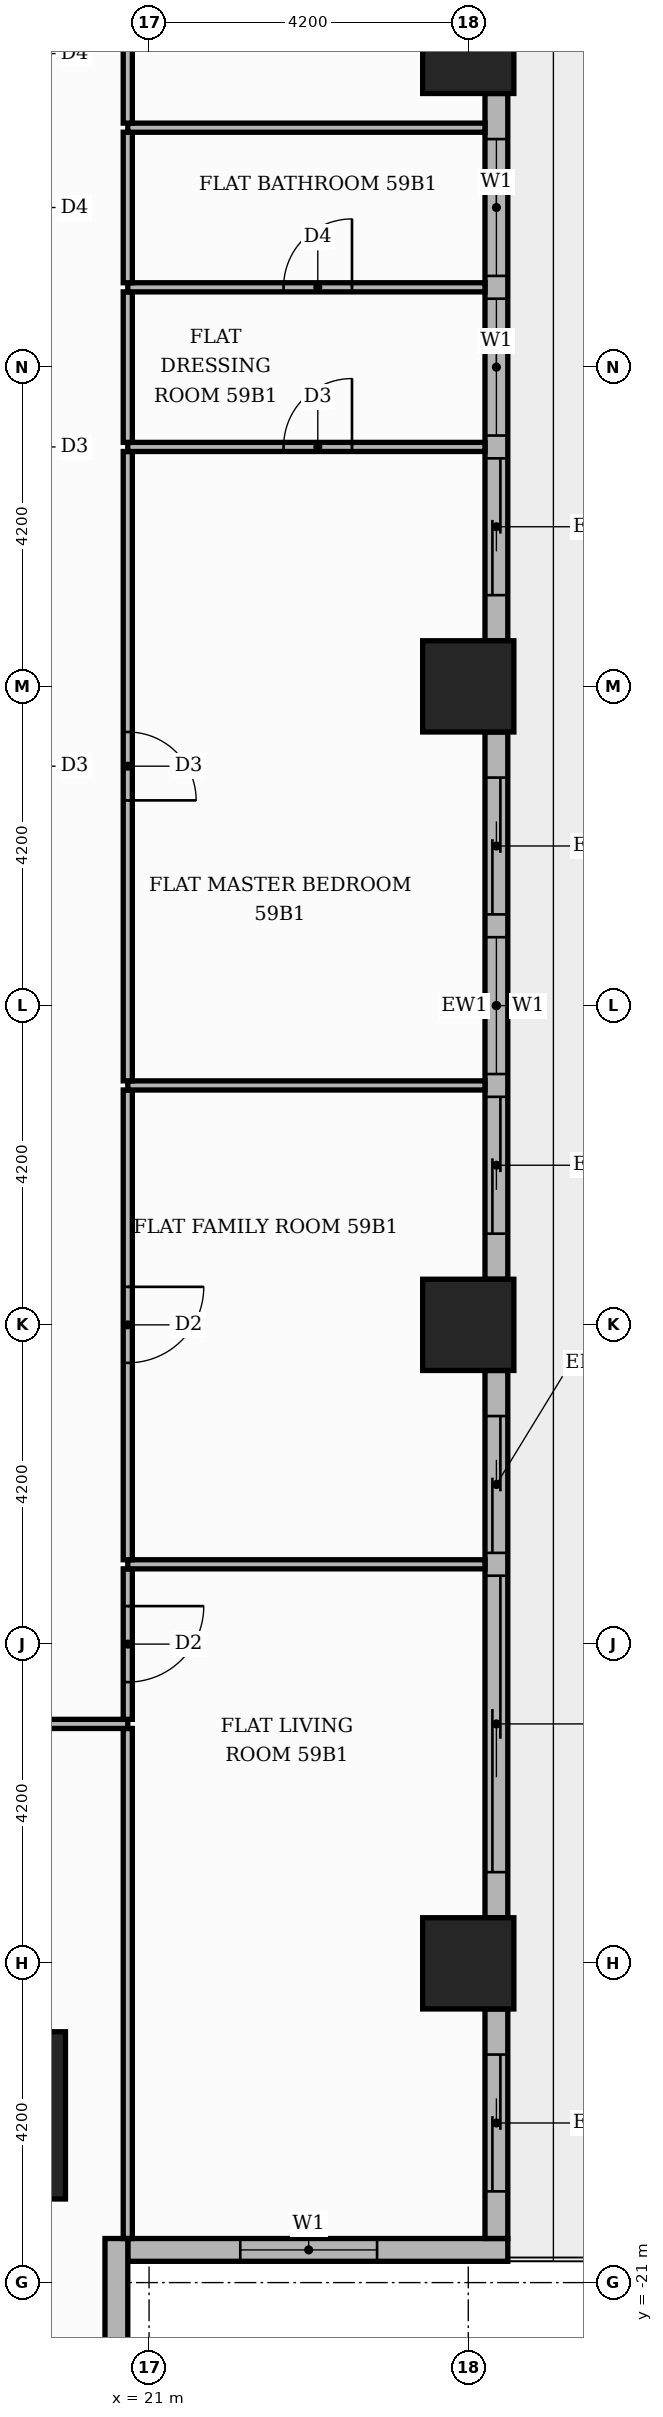
"""IFC4 building model, lengths in metres.
Left out: names, types, materials, properties, quantities, classifications, styles, units other than length and angle.
Written with IfcOpenShell. Run it as: python <this file> out.ifc"""

import sys

from ifc_helpers import new_model, si_unit, direction, frame, frame_2d, origin, origin_2d, place, context, subcontext, project, spatial, rectangle, extrude, element, fill, save


model = new_model("IFC4")
c1 = context("Model", 3, precision=1e-05, world=origin(), true_north=direction((0.0, 1.0)))
c2 = subcontext(c1, "Body", "Model", "MODEL_VIEW")
j1 = project(units=[si_unit("LENGTHUNIT", "METRE"), si_unit("PLANEANGLEUNIT", "RADIAN")], contexts=[c1])
p1 = place(None, origin())
s1 = spatial("IfcSite", under=j1, at=p1, CompositionType="ELEMENT")
p2 = place(p1, origin())
s2 = spatial("IfcBuilding", under=s1, at=p2, CompositionType="ELEMENT")
p3 = place(p2, frame((0.0, 0.0, 248.4)))
s3 = spatial("IfcBuildingStorey", under=s2, at=p3, CompositionType="ELEMENT", Elevation=248.4)
p4 = place(p3, frame((18.8, -18.8, 0.0), z_axis=(0.0, 0.0, 1.0), x_axis=(1.0, 0.0, 0.0)))
e1 = element("IfcColumn", 1, at=p4, inside=s3, PredefinedType="COLUMN", context=c2, shape_type="SweptSolid", body=[
    extrude(rectangle(XDim=2.2, YDim=2.2, at=origin_2d()), origin(), (0.0, 0.0, 1.0), 3.9),
])
for number, where, z_axis, x_axis in (
    (2, (25.2, 0.0, 0.0), (0.0, 0.0, 1.0), (1.0, 0.0, 0.0)),
    (3, (25.2, 8.4, 0.0), (0.0, 0.0, 1.0), (1.0, 0.0, 0.0)),
    (4, (25.2, -8.4, 0.0), (0.0, 0.0, 1.0), (1.0, 0.0, 0.0)),
    (5, (25.2, -16.8, 0.0), (0.0, 0.0, 1.0), (1.0, 0.0, 0.0)),
):
    element("IfcColumn", number, at=place(p3, frame(where, z_axis=z_axis, x_axis=x_axis)), inside=s3, PredefinedType="COLUMN", context=c2, shape_type="SweptSolid", body=[
        extrude(rectangle(XDim=1.2, YDim=1.2, at=origin_2d()), origin(), (0.0, 0.0, 1.0), 3.9),
    ])
p5 = place(p3, frame((20.72, -20.57, 0.0), z_axis=(0.0, 0.0, 1.0), x_axis=(1.0, 0.0, 0.0)))
e6 = element("IfcWall", 6, at=p5, inside=s3, PredefinedType="STANDARD", context=c2, shape_type="SweptSolid", body=[
    extrude(rectangle(XDim=5.0, YDim=0.3, at=frame_2d((2.5, 0.0))), origin(), (0.0, 0.0, 1.0), 3.48),
])
p6 = place(p5, frame((1.48, 0.0, 0.9)))
e7 = element("IfcOpeningElement", 7, at=p6, cuts=e6, PredefinedType="OPENING", context=c2, shape_type="SweptSolid", body=[
    extrude(rectangle(XDim=1.8, YDim=2.1, at=frame_2d((0.9, 1.05))), frame((0.0, 0.16, 0.0), z_axis=(0.0, -1.0, 0.0), x_axis=(1.0, 0.0, 0.0)), (0.0, 0.0, 1.0), 0.32),
])
p7 = place(p3, frame((25.57, -20.42, 0.0), z_axis=(0.0, 0.0, 1.0), x_axis=(0.0, 1.0, 0.0)))
e8 = element("IfcWall", 8, at=p7, inside=s3, PredefinedType="STANDARD", context=c2, shape_type="SweptSolid", body=[
    extrude(rectangle(XDim=3.02, YDim=0.3, at=frame_2d((1.51, 0.0))), origin(), (0.0, 0.0, 1.0), 3.48),
])
p8 = place(p7, frame((0.62, 0.0, 0.0)))
e9 = element("IfcOpeningElement", 9, at=p8, cuts=e8, PredefinedType="OPENING", context=c2, shape_type="SweptSolid", body=[
    extrude(rectangle(XDim=1.8, YDim=2.4, at=frame_2d((0.9, 1.2))), frame((0.0, 0.16, 0.0), z_axis=(0.0, -1.0, 0.0), x_axis=(1.0, 0.0, 0.0)), (0.0, 0.0, 1.0), 0.32),
])
p9 = place(p3, frame((25.57, -16.2, 0.0), z_axis=(0.0, 0.0, 1.0), x_axis=(0.0, 1.0, 0.0)))
e10 = element("IfcWall", 10, at=p9, inside=s3, PredefinedType="STANDARD", context=c2, shape_type="SweptSolid", body=[
    extrude(rectangle(XDim=7.2, YDim=0.3, at=frame_2d((3.6, 0.0))), origin(), (0.0, 0.0, 1.0), 3.48),
])
p10 = place(p9, frame((0.6, 0.0, 0.0)))
e11 = element("IfcOpeningElement", 11, at=p10, cuts=e10, PredefinedType="OPENING", context=c2, shape_type="SweptSolid", body=[
    extrude(rectangle(XDim=3.9, YDim=2.4, at=frame_2d((1.95, 1.2))), frame((0.0, 0.16, 0.0), z_axis=(0.0, -1.0, 0.0), x_axis=(1.0, 0.0, 0.0)), (0.0, 0.0, 1.0), 0.32),
])
p11 = place(p9, frame((4.8, 0.0, 0.0)))
e12 = element("IfcOpeningElement", 12, at=p11, cuts=e10, PredefinedType="OPENING", context=c2, shape_type="SweptSolid", body=[
    extrude(rectangle(XDim=1.8, YDim=2.4, at=frame_2d((0.9, 1.2))), frame((0.0, 0.16, 0.0), z_axis=(0.0, -1.0, 0.0), x_axis=(1.0, 0.0, 0.0)), (0.0, 0.0, 1.0), 0.32),
])
p12 = place(p3, frame((25.57, -7.8, 0.0), z_axis=(0.0, 0.0, 1.0), x_axis=(0.0, 1.0, 0.0)))
e13 = element("IfcWall", 13, at=p12, inside=s3, PredefinedType="STANDARD", context=c2, shape_type="SweptSolid", body=[
    extrude(rectangle(XDim=7.2, YDim=0.3, at=frame_2d((3.6, 0.0))), origin(), (0.0, 0.0, 1.0), 3.48),
])
p13 = place(p12, frame((0.6, 0.0, 0.0)))
e14 = element("IfcOpeningElement", 14, at=p13, cuts=e13, PredefinedType="OPENING", context=c2, shape_type="SweptSolid", body=[
    extrude(rectangle(XDim=1.8, YDim=2.4, at=frame_2d((0.9, 1.2))), frame((0.0, 0.16, 0.0), z_axis=(0.0, -1.0, 0.0), x_axis=(1.0, 0.0, 0.0)), (0.0, 0.0, 1.0), 0.32),
])
p14 = place(p12, frame((2.7, 0.0, 0.9)))
e15 = element("IfcOpeningElement", 15, at=p14, cuts=e13, PredefinedType="OPENING", context=c2, shape_type="SweptSolid", body=[
    extrude(rectangle(XDim=1.8, YDim=2.1, at=frame_2d((0.9, 1.05))), frame((0.0, 0.16, 0.0), z_axis=(0.0, -1.0, 0.0), x_axis=(1.0, 0.0, 0.0)), (0.0, 0.0, 1.0), 0.32),
])
p15 = place(p12, frame((4.8, 0.0, 0.0)))
e16 = element("IfcOpeningElement", 16, at=p15, cuts=e13, PredefinedType="OPENING", context=c2, shape_type="SweptSolid", body=[
    extrude(rectangle(XDim=1.8, YDim=2.4, at=frame_2d((0.9, 1.2))), frame((0.0, 0.16, 0.0), z_axis=(0.0, -1.0, 0.0), x_axis=(1.0, 0.0, 0.0)), (0.0, 0.0, 1.0), 0.32),
])
p16 = place(p3, frame((25.57, 0.6, 0.0), z_axis=(0.0, 0.0, 1.0), x_axis=(0.0, 1.0, 0.0)))
e17 = element("IfcWall", 17, at=p16, inside=s3, PredefinedType="STANDARD", context=c2, shape_type="SweptSolid", body=[
    extrude(rectangle(XDim=7.2, YDim=0.3, at=frame_2d((3.6, 0.0))), origin(), (0.0, 0.0, 1.0), 3.48),
])
p17 = place(p16, frame((0.6, 0.0, 0.0)))
e18 = element("IfcOpeningElement", 18, at=p17, cuts=e17, PredefinedType="OPENING", context=c2, shape_type="SweptSolid", body=[
    extrude(rectangle(XDim=1.8, YDim=2.4, at=frame_2d((0.9, 1.2))), frame((0.0, 0.16, 0.0), z_axis=(0.0, -1.0, 0.0), x_axis=(1.0, 0.0, 0.0)), (0.0, 0.0, 1.0), 0.32),
])
p18 = place(p16, frame((2.7, 0.0, 0.9)))
e19 = element("IfcOpeningElement", 19, at=p18, cuts=e17, PredefinedType="OPENING", context=c2, shape_type="SweptSolid", body=[
    extrude(rectangle(XDim=1.8, YDim=2.1, at=frame_2d((0.9, 1.05))), frame((0.0, 0.16, 0.0), z_axis=(0.0, -1.0, 0.0), x_axis=(1.0, 0.0, 0.0)), (0.0, 0.0, 1.0), 0.32),
])
p19 = place(p16, frame((4.8, 0.0, 0.9)))
e20 = element("IfcOpeningElement", 20, at=p19, cuts=e17, PredefinedType="OPENING", context=c2, shape_type="SweptSolid", body=[
    extrude(rectangle(XDim=1.8, YDim=2.1, at=frame_2d((0.9, 1.05))), frame((0.0, 0.16, 0.0), z_axis=(0.0, -1.0, 0.0), x_axis=(1.0, 0.0, 0.0)), (0.0, 0.0, 1.0), 0.32),
])
p20 = place(p3, frame((20.57, -25.42, 0.0), z_axis=(0.0, 0.0, 1.0), x_axis=(0.0, 1.0, 0.0)))
e21 = element("IfcWall", 21, at=p20, inside=s3, PredefinedType="STANDARD", context=c2, shape_type="SweptSolid", body=[
    extrude(rectangle(XDim=5.0, YDim=0.3, at=frame_2d((2.5, 0.0))), origin(), (0.0, 0.0, 1.0), 3.48),
])
p21 = place(p20, frame((1.42, 0.0, 0.9)))
e22 = element("IfcOpeningElement", 22, at=p21, cuts=e21, PredefinedType="OPENING", context=c2, shape_type="SweptSolid", body=[
    extrude(rectangle(XDim=1.8, YDim=2.1, at=frame_2d((0.9, 1.05))), frame((0.0, 0.16, 0.0), z_axis=(0.0, -1.0, 0.0), x_axis=(1.0, 0.0, 0.0)), (0.0, 0.0, 1.0), 0.32),
])
p22 = place(p3, frame((20.72, -20.42, 0.0), z_axis=(0.0, 0.0, 1.0), x_axis=(0.0, 1.0, 0.0)))
e23 = element("IfcWall", 23, at=p22, inside=s3, PredefinedType="PARTITIONING", context=c2, shape_type="SweptSolid", body=[
    extrude(rectangle(XDim=6.71, YDim=0.12, at=frame_2d((3.355, 0.0))), origin(), (0.0, 0.0, 1.0), 3.48),
])
p23 = place(p3, frame((13.65, -13.65, 0.0), z_axis=(0.0, 0.0, 1.0), x_axis=(1.0, 0.0, 0.0)))
e24 = element("IfcWall", 24, at=p23, inside=s3, PredefinedType="PARTITIONING", context=c2, shape_type="SweptSolid", body=[
    extrude(rectangle(XDim=7.07, YDim=0.12, at=frame_2d((3.535, 0.0))), origin(), (0.0, 0.0, 1.0), 3.48),
])
p24 = place(p23, frame((3.085, 0.0, 0.0)))
e25 = element("IfcOpeningElement", 25, at=p24, cuts=e24, PredefinedType="OPENING", context=c2, shape_type="SweptSolid", body=[
    extrude(rectangle(XDim=0.9, YDim=2.1, at=frame_2d((0.45, 1.05))), frame((0.0, 0.07, 0.0), z_axis=(0.0, -1.0, 0.0), x_axis=(1.0, 0.0, 0.0)), (0.0, 0.0, 1.0), 0.14),
])
p25 = place(p3, frame((20.72, -13.59, 0.0), z_axis=(0.0, 0.0, 1.0), x_axis=(0.0, 1.0, 0.0)))
e26 = element("IfcWall", 26, at=p25, inside=s3, PredefinedType="PARTITIONING", context=c2, shape_type="SweptSolid", body=[
    extrude(rectangle(XDim=1.98, YDim=0.12, at=frame_2d((0.99, 0.0))), origin(), (0.0, 0.0, 1.0), 3.48),
])
p26 = place(p25, frame((0.49, 0.0, 0.0)))
e27 = element("IfcOpeningElement", 27, at=p26, cuts=e26, PredefinedType="OPENING", context=c2, shape_type="SweptSolid", body=[
    extrude(rectangle(XDim=1.0, YDim=2.1, at=frame_2d((0.5, 1.05))), frame((0.0, 0.07, 0.0), z_axis=(0.0, -1.0, 0.0), x_axis=(1.0, 0.0, 0.0)), (0.0, 0.0, 1.0), 0.14),
])
p27 = place(p3, frame((20.72, -11.55, 0.0), z_axis=(0.0, 0.0, 1.0), x_axis=(1.0, 0.0, 0.0)))
e28 = element("IfcWall", 28, at=p27, inside=s3, PredefinedType="PARTITIONING", context=c2, shape_type="SweptSolid", body=[
    extrude(rectangle(XDim=4.7, YDim=0.12, at=frame_2d((2.35, 0.0))), origin(), (0.0, 0.0, 1.0), 3.48),
])
p28 = place(p3, frame((20.72, -11.49, 0.0), z_axis=(0.0, 0.0, 1.0), x_axis=(0.0, 1.0, 0.0)))
e29 = element("IfcWall", 29, at=p28, inside=s3, PredefinedType="PARTITIONING", context=c2, shape_type="SweptSolid", body=[
    extrude(rectangle(XDim=6.18, YDim=0.12, at=frame_2d((3.09, 0.0))), origin(), (0.0, 0.0, 1.0), 3.48),
])
p29 = place(p28, frame((2.59, 0.0, 0.0)))
e30 = element("IfcOpeningElement", 30, at=p29, cuts=e29, PredefinedType="OPENING", context=c2, shape_type="SweptSolid", body=[
    extrude(rectangle(XDim=1.0, YDim=2.1, at=frame_2d((0.5, 1.05))), frame((0.0, 0.07, 0.0), z_axis=(0.0, -1.0, 0.0), x_axis=(1.0, 0.0, 0.0)), (0.0, 0.0, 1.0), 0.14),
])
p30 = place(p3, frame((20.72, -5.25, 0.0), z_axis=(0.0, 0.0, 1.0), x_axis=(1.0, 0.0, 0.0)))
e31 = element("IfcWall", 31, at=p30, inside=s3, PredefinedType="PARTITIONING", context=c2, shape_type="SweptSolid", body=[
    extrude(rectangle(XDim=4.7, YDim=0.12, at=frame_2d((2.35, 0.0))), origin(), (0.0, 0.0, 1.0), 3.48),
])
p31 = place(p3, frame((20.72, -5.19, 0.0), z_axis=(0.0, 0.0, 1.0), x_axis=(0.0, 1.0, 0.0)))
e32 = element("IfcWall", 32, at=p31, inside=s3, PredefinedType="PARTITIONING", context=c2, shape_type="SweptSolid", body=[
    extrude(rectangle(XDim=8.28, YDim=0.12, at=frame_2d((4.14, 0.0))), origin(), (0.0, 0.0, 1.0), 3.48),
])
p32 = place(p31, frame((3.69, 0.0, 0.0)))
e33 = element("IfcOpeningElement", 33, at=p32, cuts=e32, PredefinedType="OPENING", context=c2, shape_type="SweptSolid", body=[
    extrude(rectangle(XDim=0.9, YDim=2.1, at=frame_2d((0.45, 1.05))), frame((0.0, 0.07, 0.0), z_axis=(0.0, -1.0, 0.0), x_axis=(1.0, 0.0, 0.0)), (0.0, 0.0, 1.0), 0.14),
])
p33 = place(p3, frame((20.72, 3.15, 0.0), z_axis=(0.0, 0.0, 1.0), x_axis=(1.0, 0.0, 0.0)))
e34 = element("IfcWall", 34, at=p33, inside=s3, PredefinedType="PARTITIONING", context=c2, shape_type="SweptSolid", body=[
    extrude(rectangle(XDim=4.7, YDim=0.12, at=frame_2d((2.35, 0.0))), origin(), (0.0, 0.0, 1.0), 3.48),
])
p34 = place(p33, frame((2.05, 0.0, 0.0)))
e35 = element("IfcOpeningElement", 35, at=p34, cuts=e34, PredefinedType="OPENING", context=c2, shape_type="SweptSolid", body=[
    extrude(rectangle(XDim=0.9, YDim=2.1, at=frame_2d((0.45, 1.05))), frame((0.0, 0.07, 0.0), z_axis=(0.0, -1.0, 0.0), x_axis=(1.0, 0.0, 0.0)), (0.0, 0.0, 1.0), 0.14),
])
p35 = place(p3, frame((20.72, 3.21, 0.0), z_axis=(0.0, 0.0, 1.0), x_axis=(0.0, 1.0, 0.0)))
e36 = element("IfcWall", 36, at=p35, inside=s3, PredefinedType="PARTITIONING", context=c2, shape_type="SweptSolid", body=[
    extrude(rectangle(XDim=1.98, YDim=0.12, at=frame_2d((0.99, 0.0))), origin(), (0.0, 0.0, 1.0), 3.48),
])
p36 = place(p3, frame((20.72, 5.25, 0.0), z_axis=(0.0, 0.0, 1.0), x_axis=(1.0, 0.0, 0.0)))
e37 = element("IfcWall", 37, at=p36, inside=s3, PredefinedType="PARTITIONING", context=c2, shape_type="SweptSolid", body=[
    extrude(rectangle(XDim=4.7, YDim=0.12, at=frame_2d((2.35, 0.0))), origin(), (0.0, 0.0, 1.0), 3.48),
])
p37 = place(p36, frame((2.05, 0.0, 0.0)))
e38 = element("IfcOpeningElement", 38, at=p37, cuts=e37, PredefinedType="OPENING", context=c2, shape_type="SweptSolid", body=[
    extrude(rectangle(XDim=0.9, YDim=2.1, at=frame_2d((0.45, 1.05))), frame((0.0, 0.07, 0.0), z_axis=(0.0, -1.0, 0.0), x_axis=(1.0, 0.0, 0.0)), (0.0, 0.0, 1.0), 0.14),
])
p38 = place(p3, frame((20.72, 5.31, 0.0), z_axis=(0.0, 0.0, 1.0), x_axis=(0.0, 1.0, 0.0)))
e39 = element("IfcWall", 39, at=p38, inside=s3, PredefinedType="PARTITIONING", context=c2, shape_type="SweptSolid", body=[
    extrude(rectangle(XDim=1.98, YDim=0.12, at=frame_2d((0.99, 0.0))), origin(), (0.0, 0.0, 1.0), 3.48),
])
p39 = place(p3, frame((20.72, 7.35, 0.0), z_axis=(0.0, 0.0, 1.0), x_axis=(1.0, 0.0, 0.0)))
e40 = element("IfcWall", 40, at=p39, inside=s3, PredefinedType="PARTITIONING", context=c2, shape_type="SweptSolid", body=[
    extrude(rectangle(XDim=4.7, YDim=0.12, at=frame_2d((2.35, 0.0))), origin(), (0.0, 0.0, 1.0), 3.48),
])
p40 = place(p3, frame((20.72, 7.41, 0.0), z_axis=(0.0, 0.0, 1.0), x_axis=(0.0, 1.0, 0.0)))
e41 = element("IfcWall", 41, at=p40, inside=s3, PredefinedType="PARTITIONING", context=c2, shape_type="SweptSolid", body=[
    extrude(rectangle(XDim=4.08, YDim=0.12, at=frame_2d((2.04, 0.0))), origin(), (0.0, 0.0, 1.0), 3.48),
])
p41 = place(p40, frame((1.59, 0.0, 0.0)))
e42 = element("IfcOpeningElement", 42, at=p41, cuts=e41, PredefinedType="OPENING", context=c2, shape_type="SweptSolid", body=[
    extrude(rectangle(XDim=0.9, YDim=2.1, at=frame_2d((0.45, 1.05))), frame((0.0, 0.07, 0.0), z_axis=(0.0, -1.0, 0.0), x_axis=(1.0, 0.0, 0.0)), (0.0, 0.0, 1.0), 0.14),
])
p42 = place(p6, origin())
e43 = element("IfcWindow", 43, at=p42, inside=s3, PartitioningType="SINGLE_PANEL", PredefinedType="WINDOW", context=c2, shape_type="SweptSolid", body=[
    extrude(rectangle(XDim=1.8, YDim=2.1, at=frame_2d((0.9, 1.05))), frame((0.0, 0.03, 0.0), z_axis=(0.0, -1.0, 0.0), x_axis=(1.0, 0.0, 0.0)), (0.0, 0.0, 1.0), 0.06),
])
fill(e7, e43)
p43 = place(p8, origin())
e44 = element("IfcDoor", 44, at=p43, inside=s3, OperationType="SLIDING_TO_RIGHT", PredefinedType="DOOR", context=c2, shape_type="SweptSolid", body=[
    extrude(rectangle(XDim=1.8, YDim=2.4, at=frame_2d((0.9, 1.2))), frame((0.0, 0.025, 0.0), z_axis=(0.0, -1.0, 0.0), x_axis=(1.0, 0.0, 0.0)), (0.0, 0.0, 1.0), 0.05),
])
fill(e9, e44)
p44 = place(p10, origin())
e45 = element("IfcDoor", 45, at=p44, inside=s3, OperationType="SLIDING_TO_LEFT", PredefinedType="DOOR", context=c2, shape_type="SweptSolid", body=[
    extrude(rectangle(XDim=3.9, YDim=2.4, at=frame_2d((1.95, 1.2))), frame((0.0, 0.025, 0.0), z_axis=(0.0, -1.0, 0.0), x_axis=(1.0, 0.0, 0.0)), (0.0, 0.0, 1.0), 0.05),
])
fill(e11, e45)
p45 = place(p11, origin())
e46 = element("IfcDoor", 46, at=p45, inside=s3, OperationType="SLIDING_TO_RIGHT", PredefinedType="DOOR", context=c2, shape_type="SweptSolid", body=[
    extrude(rectangle(XDim=1.8, YDim=2.4, at=frame_2d((0.9, 1.2))), frame((0.0, 0.025, 0.0), z_axis=(0.0, -1.0, 0.0), x_axis=(1.0, 0.0, 0.0)), (0.0, 0.0, 1.0), 0.05),
])
fill(e12, e46)
p46 = place(p13, origin())
e47 = element("IfcDoor", 47, at=p46, inside=s3, OperationType="SLIDING_TO_LEFT", PredefinedType="DOOR", context=c2, shape_type="SweptSolid", body=[
    extrude(rectangle(XDim=1.8, YDim=2.4, at=frame_2d((0.9, 1.2))), frame((0.0, 0.025, 0.0), z_axis=(0.0, -1.0, 0.0), x_axis=(1.0, 0.0, 0.0)), (0.0, 0.0, 1.0), 0.05),
])
fill(e14, e47)
p47 = place(p14, origin())
e48 = element("IfcWindow", 48, at=p47, inside=s3, PartitioningType="SINGLE_PANEL", PredefinedType="WINDOW", context=c2, shape_type="SweptSolid", body=[
    extrude(rectangle(XDim=1.8, YDim=2.1, at=frame_2d((0.9, 1.05))), frame((0.0, 0.03, 0.0), z_axis=(0.0, -1.0, 0.0), x_axis=(1.0, 0.0, 0.0)), (0.0, 0.0, 1.0), 0.06),
])
fill(e15, e48)
p48 = place(p15, origin())
e49 = element("IfcDoor", 49, at=p48, inside=s3, OperationType="SLIDING_TO_RIGHT", PredefinedType="DOOR", context=c2, shape_type="SweptSolid", body=[
    extrude(rectangle(XDim=1.8, YDim=2.4, at=frame_2d((0.9, 1.2))), frame((0.0, 0.025, 0.0), z_axis=(0.0, -1.0, 0.0), x_axis=(1.0, 0.0, 0.0)), (0.0, 0.0, 1.0), 0.05),
])
fill(e16, e49)
p49 = place(p17, origin())
e50 = element("IfcDoor", 50, at=p49, inside=s3, OperationType="SLIDING_TO_LEFT", PredefinedType="DOOR", context=c2, shape_type="SweptSolid", body=[
    extrude(rectangle(XDim=1.8, YDim=2.4, at=frame_2d((0.9, 1.2))), frame((0.0, 0.025, 0.0), z_axis=(0.0, -1.0, 0.0), x_axis=(1.0, 0.0, 0.0)), (0.0, 0.0, 1.0), 0.05),
])
fill(e18, e50)
p50 = place(p18, origin())
e51 = element("IfcWindow", 51, at=p50, inside=s3, PartitioningType="SINGLE_PANEL", PredefinedType="WINDOW", context=c2, shape_type="SweptSolid", body=[
    extrude(rectangle(XDim=1.8, YDim=2.1, at=frame_2d((0.9, 1.05))), frame((0.0, 0.03, 0.0), z_axis=(0.0, -1.0, 0.0), x_axis=(1.0, 0.0, 0.0)), (0.0, 0.0, 1.0), 0.06),
])
fill(e19, e51)
p51 = place(p19, origin())
e52 = element("IfcWindow", 52, at=p51, inside=s3, PartitioningType="SINGLE_PANEL", PredefinedType="WINDOW", context=c2, shape_type="SweptSolid", body=[
    extrude(rectangle(XDim=1.8, YDim=2.1, at=frame_2d((0.9, 1.05))), frame((0.0, 0.03, 0.0), z_axis=(0.0, -1.0, 0.0), x_axis=(1.0, 0.0, 0.0)), (0.0, 0.0, 1.0), 0.06),
])
fill(e20, e52)
p52 = place(p26, frame((1.0, 0.0, 0.0), z_axis=(0.0, 0.0, 1.0), x_axis=(-1.0, 0.0, 0.0)))
e53 = element("IfcDoor", 53, at=p52, inside=s3, OperationType="SINGLE_SWING_RIGHT", PredefinedType="DOOR", context=c2, shape_type="SweptSolid", body=[
    extrude(rectangle(XDim=1.0, YDim=2.1, at=frame_2d((0.5, 1.05))), frame((0.0, 0.025, 0.0), z_axis=(0.0, -1.0, 0.0), x_axis=(1.0, 0.0, 0.0)), (0.0, 0.0, 1.0), 0.05),
])
fill(e27, e53)
p53 = place(p29, frame((1.0, 0.0, 0.0), z_axis=(0.0, 0.0, 1.0), x_axis=(-1.0, 0.0, 0.0)))
e54 = element("IfcDoor", 54, at=p53, inside=s3, OperationType="SINGLE_SWING_RIGHT", PredefinedType="DOOR", context=c2, shape_type="SweptSolid", body=[
    extrude(rectangle(XDim=1.0, YDim=2.1, at=frame_2d((0.5, 1.05))), frame((0.0, 0.025, 0.0), z_axis=(0.0, -1.0, 0.0), x_axis=(1.0, 0.0, 0.0)), (0.0, 0.0, 1.0), 0.05),
])
fill(e30, e54)
p54 = place(p32, frame((0.9, 0.0, 0.0), z_axis=(0.0, 0.0, 1.0), x_axis=(-1.0, 0.0, 0.0)))
e55 = element("IfcDoor", 55, at=p54, inside=s3, OperationType="SINGLE_SWING_LEFT", PredefinedType="DOOR", context=c2, shape_type="SweptSolid", body=[
    extrude(rectangle(XDim=0.9, YDim=2.1, at=frame_2d((0.45, 1.05))), frame((0.0, 0.025, 0.0), z_axis=(0.0, -1.0, 0.0), x_axis=(1.0, 0.0, 0.0)), (0.0, 0.0, 1.0), 0.05),
])
fill(e33, e55)
p55 = place(p34, origin())
e56 = element("IfcDoor", 56, at=p55, inside=s3, OperationType="SINGLE_SWING_RIGHT", PredefinedType="DOOR", context=c2, shape_type="SweptSolid", body=[
    extrude(rectangle(XDim=0.9, YDim=2.1, at=frame_2d((0.45, 1.05))), frame((0.0, 0.025, 0.0), z_axis=(0.0, -1.0, 0.0), x_axis=(1.0, 0.0, 0.0)), (0.0, 0.0, 1.0), 0.05),
])
fill(e35, e56)
p56 = place(p37, origin())
e57 = element("IfcDoor", 57, at=p56, inside=s3, OperationType="SINGLE_SWING_RIGHT", PredefinedType="DOOR", context=c2, shape_type="SweptSolid", body=[
    extrude(rectangle(XDim=0.9, YDim=2.1, at=frame_2d((0.45, 1.05))), frame((0.0, 0.025, 0.0), z_axis=(0.0, -1.0, 0.0), x_axis=(1.0, 0.0, 0.0)), (0.0, 0.0, 1.0), 0.05),
])
fill(e38, e57)
save(model, sys.argv[1])
